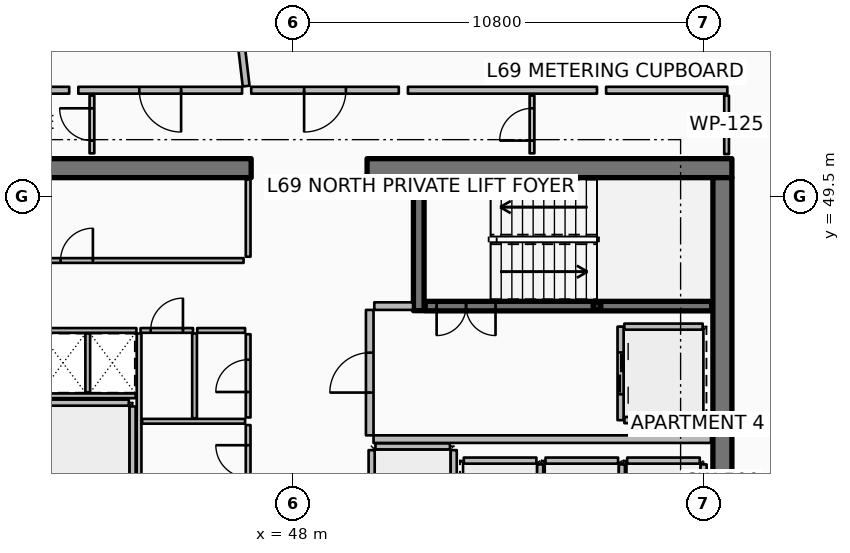
"""IFC4 building model, lengths in metres.
Left out: names, types, materials, properties, quantities, classifications, styles, units other than length and angle.
Written with IfcOpenShell. Run it as: python <this file> out.ifc"""

import sys

from ifc_helpers import new_model, si_unit, direction, frame, frame_2d, origin, origin_2d, place, context, subcontext, project, spatial, rectangle, hollow_rectangle, extrude, element, fill, save


model = new_model("IFC4")
c1 = context("Model", 3, precision=1e-05, world=origin(), true_north=direction((0.0, 1.0)))
c2 = subcontext(c1, "Body", "Model", "MODEL_VIEW")
j1 = project(units=[si_unit("LENGTHUNIT", "METRE"), si_unit("PLANEANGLEUNIT", "RADIAN")], contexts=[c1])
p1 = place(None, origin())
s1 = spatial("IfcSite", under=j1, at=p1, CompositionType="ELEMENT")
p2 = place(p1, origin())
s2 = spatial("IfcBuilding", under=s1, at=p2, CompositionType="ELEMENT")
p3 = place(p2, frame((0.0, 0.0, 275.2)))
s3 = spatial("IfcBuildingStorey", under=s2, at=p3, CompositionType="ELEMENT", Elevation=275.2)
p4 = place(p3, frame((37.3, 50.25, 0.0), z_axis=(0.0, 0.0, 1.0), x_axis=(1.0, 0.0, 0.0)))
e1 = element("IfcWall", 1, at=p4, inside=s3, PredefinedType="SHEAR", context=c2, shape_type="SweptSolid", body=[
    extrude(rectangle(XDim=9.6, YDim=0.5, at=frame_2d((4.8, 0.0))), origin(), (0.0, 0.0, 1.0), 3.85),
])
p5 = place(p3, frame((49.95, 50.25, 0.0), z_axis=(0.0, 0.0, 1.0), x_axis=(1.0, 0.0, 0.0)))
e2 = element("IfcWall", 2, at=p5, inside=s3, PredefinedType="SHEAR", context=c2, shape_type="SweptSolid", body=[
    extrude(rectangle(XDim=9.6, YDim=0.5, at=frame_2d((4.8, 0.0))), origin(), (0.0, 0.0, 1.0), 3.85),
])
p6 = place(p3, frame((59.3, 34.0, 0.0), z_axis=(0.0, 0.0, 1.0), x_axis=(0.0, 1.0, 0.0)))
e3 = element("IfcWall", 3, at=p6, inside=s3, PredefinedType="SHEAR", context=c2, shape_type="SweptSolid", body=[
    extrude(rectangle(XDim=16.0, YDim=0.5, at=frame_2d((8.0, 0.0))), origin(), (0.0, 0.0, 1.0), 3.85),
])
p7 = place(p3, frame((51.31, 46.5, 0.0), z_axis=(0.0, 0.0, 1.0), x_axis=(0.0, 1.0, 0.0)))
e4 = element("IfcWall", 4, at=p7, inside=s3, PredefinedType="SHEAR", context=c2, shape_type="SweptSolid", body=[
    extrude(rectangle(XDim=3.5, YDim=0.28, at=frame_2d((1.75, 0.0))), origin(), (0.0, 0.0, 1.0), 3.85),
])
p8 = place(p3, frame((56.0, 46.62, 0.0), z_axis=(0.0, 0.0, 1.0), x_axis=(1.0, 0.0, 0.0)))
e5 = element("IfcColumn", 5, at=p8, inside=s3, PredefinedType="COLUMN", context=c2, shape_type="SweptSolid", body=[
    extrude(hollow_rectangle(XDim=0.2, YDim=0.2, WallThickness=0.01, InnerFilletRadius=0.01, OuterFilletRadius=0.02, at=origin_2d()), origin(), (0.0, 0.0, 1.0), 1.72),
])
p9 = place(p3, frame((51.48, 46.62, 0.0), z_axis=(0.0, 0.0, 1.0), x_axis=(1.0, 0.0, 0.0)))
e6 = element("IfcWall", 6, at=p9, inside=s3, PredefinedType="SOLIDWALL", context=c2, shape_type="SweptSolid", body=[
    extrude(rectangle(XDim=7.54, YDim=0.25, at=frame_2d((3.77, 0.0))), origin(), (0.0, 0.0, 1.0), 3.59),
])
p10 = place(p9, frame((0.3, 0.0, 0.0)))
e7 = element("IfcOpeningElement", 7, at=p10, cuts=e6, PredefinedType="OPENING", context=c2, shape_type="SweptSolid", body=[
    extrude(rectangle(XDim=1.55, YDim=2.15, at=frame_2d((0.775, 1.075))), frame((0.0, 0.135, 0.0), z_axis=(0.0, -1.0, 0.0), x_axis=(1.0, 0.0, 0.0)), (0.0, 0.0, 1.0), 0.27),
])
p11 = place(p3, frame((54.505, 40.845, 0.0), z_axis=(0.0, 0.0, 1.0), x_axis=(0.0, 1.0, 0.0)))
e8 = element("IfcWall", 8, at=p11, inside=s3, PredefinedType="PARTITIONING", context=c2, shape_type="SweptSolid", body=[
    extrude(rectangle(XDim=1.61, YDim=0.16, at=frame_2d((0.805, 0.0))), origin(), (0.0, 0.0, 1.0), 3.59),
])
p12 = place(p3, frame((52.495, 42.555, 0.0), z_axis=(0.0, 0.0, 1.0), x_axis=(1.0, 0.0, 0.0)))
e9 = element("IfcWall", 9, at=p12, inside=s3, PredefinedType="PARTITIONING", context=c2, shape_type="SweptSolid", body=[
    extrude(rectangle(XDim=1.91, YDim=0.16, at=frame_2d((0.955, 0.0))), origin(), (0.0, 0.0, 1.0), 3.59),
])
p13 = place(p3, frame((56.655, 40.845, 0.0), z_axis=(0.0, 0.0, 1.0), x_axis=(0.0, 1.0, 0.0)))
e10 = element("IfcWall", 10, at=p13, inside=s3, PredefinedType="PARTITIONING", context=c2, shape_type="SweptSolid", body=[
    extrude(rectangle(XDim=1.61, YDim=0.16, at=frame_2d((0.805, 0.0))), origin(), (0.0, 0.0, 1.0), 3.59),
])
p14 = place(p3, frame((54.645, 42.555, 0.0), z_axis=(0.0, 0.0, 1.0), x_axis=(1.0, 0.0, 0.0)))
e11 = element("IfcWall", 11, at=p14, inside=s3, PredefinedType="PARTITIONING", context=c2, shape_type="SweptSolid", body=[
    extrude(rectangle(XDim=1.91, YDim=0.16, at=frame_2d((0.955, 0.0))), origin(), (0.0, 0.0, 1.0), 3.59),
])
p15 = place(p3, frame((58.805, 40.845, 0.0), z_axis=(0.0, 0.0, 1.0), x_axis=(0.0, 1.0, 0.0)))
e12 = element("IfcWall", 12, at=p15, inside=s3, PredefinedType="PARTITIONING", context=c2, shape_type="SweptSolid", body=[
    extrude(rectangle(XDim=1.61, YDim=0.16, at=frame_2d((0.805, 0.0))), origin(), (0.0, 0.0, 1.0), 3.59),
])
p16 = place(p3, frame((56.795, 42.555, 0.0), z_axis=(0.0, 0.0, 1.0), x_axis=(1.0, 0.0, 0.0)))
e13 = element("IfcWall", 13, at=p16, inside=s3, PredefinedType="PARTITIONING", context=c2, shape_type="SweptSolid", body=[
    extrude(rectangle(XDim=1.91, YDim=0.16, at=frame_2d((0.955, 0.0))), origin(), (0.0, 0.0, 1.0), 3.59),
])
p17 = place(p3, frame((43.78, 41.72, 0.0), z_axis=(0.0, 0.0, 1.0), x_axis=(0.0, 1.0, 0.0)))
e14 = element("IfcWall", 14, at=p17, inside=s3, PredefinedType="PARTITIONING", context=c2, shape_type="SweptSolid", body=[
    extrude(rectangle(XDim=2.26, YDim=0.16, at=frame_2d((1.13, 0.0))), origin(), (0.0, 0.0, 1.0), 3.59),
])
p18 = place(p3, frame((41.62, 44.08, 0.0), z_axis=(0.0, 0.0, 1.0), x_axis=(1.0, 0.0, 0.0)))
e15 = element("IfcWall", 15, at=p18, inside=s3, PredefinedType="PARTITIONING", context=c2, shape_type="SweptSolid", body=[
    extrude(rectangle(XDim=2.06, YDim=0.16, at=frame_2d((1.03, 0.0))), origin(), (0.0, 0.0, 1.0), 3.59),
])
p19 = place(p3, frame((56.62, 46.08, 0.0), z_axis=(0.0, 0.0, 1.0), x_axis=(0.0, -1.0, 0.0)))
e16 = element("IfcWall", 16, at=p19, inside=s3, PredefinedType="PARTITIONING", context=c2, shape_type="SweptSolid", body=[
    extrude(rectangle(XDim=2.46, YDim=0.16, at=frame_2d((1.23, 0.0))), origin(), (0.0, 0.0, 1.0), 3.59),
])
p20 = place(p19, frame((0.68, 0.0, 0.0)))
e17 = element("IfcOpeningElement", 17, at=p20, cuts=e16, PredefinedType="OPENING", context=c2, shape_type="SweptSolid", body=[
    extrude(rectangle(XDim=1.1, YDim=2.1, at=frame_2d((0.55, 1.05))), frame((0.0, 0.09, 0.0), z_axis=(0.0, -1.0, 0.0), x_axis=(1.0, 0.0, 0.0)), (0.0, 0.0, 1.0), 0.18),
])
for number, where, z_axis, x_axis in (
    (18, (56.72, 46.08, 0.0), (0.0, 0.0, 1.0), (1.0, 0.0, 0.0)),
    (19, (56.72, 43.62, 0.0), (0.0, 0.0, 1.0), (1.0, 0.0, 0.0)),
):
    element("IfcWall", number, at=place(p3, frame(where, z_axis=z_axis, x_axis=x_axis)), inside=s3, PredefinedType="PARTITIONING", context=c2, shape_type="SweptSolid", body=[
        extrude(rectangle(XDim=2.06, YDim=0.16, at=frame_2d((1.03, 0.0))), origin(), (0.0, 0.0, 1.0), 3.59),
    ])
for number, where, z_axis, x_axis in (
    (20, (52.23, 40.67, 0.0), (0.0, 0.0, 1.0), (0.0, 1.0, 0.0)),
    (21, (50.07, 40.67, 0.0), (0.0, 0.0, 1.0), (0.0, 1.0, 0.0)),
):
    element("IfcWall", number, at=place(p3, frame(where, z_axis=z_axis, x_axis=x_axis)), inside=s3, PredefinedType="PARTITIONING", context=c2, shape_type="SweptSolid", body=[
        extrude(rectangle(XDim=2.16, YDim=0.16, at=frame_2d((1.08, 0.0))), origin(), (0.0, 0.0, 1.0), 3.59),
    ])
p21 = place(p3, frame((50.17, 42.93, 0.0), z_axis=(0.0, 0.0, 1.0), x_axis=(1.0, 0.0, 0.0)))
e22 = element("IfcWall", 22, at=p21, inside=s3, PredefinedType="PARTITIONING", context=c2, shape_type="SweptSolid", body=[
    extrude(rectangle(XDim=1.96, YDim=0.16, at=frame_2d((0.98, 0.0))), origin(), (0.0, 0.0, 1.0), 3.59),
])
p22 = place(p3, frame((46.82, 47.92, 0.0), z_axis=(0.0, 0.0, 1.0), x_axis=(0.0, 1.0, 0.0)))
e23 = element("IfcWall", 23, at=p22, inside=s3, PredefinedType="PARTITIONING", context=c2, shape_type="SweptSolid", body=[
    extrude(rectangle(XDim=2.03, YDim=0.125, at=frame_2d((1.015, 0.0))), origin(), (0.0, 0.0, 1.0), 3.03),
])
p23 = place(p3, frame((37.92, 47.82, 0.0), z_axis=(0.0, 0.0, 1.0), x_axis=(1.0, 0.0, 0.0)))
e24 = element("IfcWall", 24, at=p23, inside=s3, PredefinedType="PARTITIONING", context=c2, shape_type="SweptSolid", body=[
    extrude(rectangle(XDim=8.78, YDim=0.125, at=frame_2d((4.39, 0.0))), origin(), (0.0, 0.0, 1.0), 3.03),
])
p24 = place(p23, frame((3.965, 0.0, 0.0)))
e25 = element("IfcOpeningElement", 25, at=p24, cuts=e24, PredefinedType="OPENING", context=c2, shape_type="SweptSolid", body=[
    extrude(rectangle(XDim=0.85, YDim=2.06, at=frame_2d((0.425, 1.03))), frame((0.0, 0.073, 0.0), z_axis=(0.0, -1.0, 0.0), x_axis=(1.0, 0.0, 0.0)), (0.0, 0.0, 1.0), 0.145),
])
p25 = place(p3, frame((50.12, 43.12, 0.0), z_axis=(0.0, 0.0, 1.0), x_axis=(1.0, 0.0, 0.0)))
e26 = element("IfcWall", 26, at=p25, inside=s3, PredefinedType="PARTITIONING", context=c2, shape_type="SweptSolid", body=[
    extrude(rectangle(XDim=8.88, YDim=0.2, at=frame_2d((4.44, 0.0))), origin(), (0.0, 0.0, 1.0), 3.59),
])
p26 = place(p3, frame((50.14, 46.62, 0.0), z_axis=(0.0, 0.0, 1.0), x_axis=(1.0, 0.0, 0.0)))
e27 = element("IfcWall", 27, at=p26, inside=s3, PredefinedType="PARTITIONING", context=c2, shape_type="SweptSolid", body=[
    extrude(rectangle(XDim=1.02, YDim=0.2, at=frame_2d((0.51, 0.0))), origin(), (0.0, 0.0, 1.0), 3.59),
])
p27 = place(p3, frame((50.02, 43.22, 0.0), z_axis=(0.0, 0.0, 1.0), x_axis=(0.0, 1.0, 0.0)))
e28 = element("IfcWall", 28, at=p27, inside=s3, PredefinedType="PARTITIONING", context=c2, shape_type="SweptSolid", body=[
    extrude(rectangle(XDim=3.3, YDim=0.2, at=frame_2d((1.65, 0.0))), origin(), (0.0, 0.0, 1.0), 3.59),
])
p28 = place(p27, frame((1.125, 0.0, 0.0)))
e29 = element("IfcOpeningElement", 29, at=p28, cuts=e28, PredefinedType="OPENING", context=c2, shape_type="SweptSolid", body=[
    extrude(rectangle(XDim=1.05, YDim=2.1, at=frame_2d((0.525, 1.05))), frame((0.0, 0.11, 0.0), z_axis=(0.0, -1.0, 0.0), x_axis=(1.0, 0.0, 0.0)), (0.0, 0.0, 1.0), 0.22),
])
p29 = place(p3, frame((41.36, 44.26, 0.0), z_axis=(0.0, 0.0, 1.0), x_axis=(1.0, 0.0, 0.0)))
e30 = element("IfcWall", 30, at=p29, inside=s3, PredefinedType="PARTITIONING", context=c2, shape_type="SweptSolid", body=[
    extrude(rectangle(XDim=2.5, YDim=0.125, at=frame_2d((1.25, 0.0))), origin(), (0.0, 0.0, 1.0), 3.03),
])
p30 = place(p3, frame((42.6, 44.35, 0.0), z_axis=(0.0, 0.0, 1.0), x_axis=(0.0, 1.0, 0.0)))
e31 = element("IfcWall", 31, at=p30, inside=s3, PredefinedType="PARTITIONING", context=c2, shape_type="SweptSolid", body=[
    extrude(rectangle(XDim=1.55, YDim=0.125, at=frame_2d((0.775, 0.0))), origin(), (0.0, 0.0, 1.0), 3.03),
])
p31 = place(p3, frame((43.95, 41.58, 0.0), z_axis=(0.0, 0.0, 1.0), x_axis=(0.0, 1.0, 0.0)))
e32 = element("IfcWall", 32, at=p31, inside=s3, PredefinedType="PARTITIONING", context=c2, shape_type="SweptSolid", body=[
    extrude(rectangle(XDim=4.32, YDim=0.125, at=frame_2d((2.16, 0.0))), origin(), (0.0, 0.0, 1.0), 3.03),
])
p32 = place(p3, frame((44.03, 43.59, 0.0), z_axis=(0.0, 0.0, 1.0), x_axis=(1.0, 0.0, 0.0)))
e33 = element("IfcWall", 33, at=p32, inside=s3, PredefinedType="PARTITIONING", context=c2, shape_type="SweptSolid", body=[
    extrude(rectangle(XDim=2.71, YDim=0.125, at=frame_2d((1.355, 0.0))), origin(), (0.0, 0.0, 1.0), 3.03),
])
p33 = place(p3, frame((45.41, 43.67, 0.0), z_axis=(0.0, 0.0, 1.0), x_axis=(0.0, 1.0, 0.0)))
e34 = element("IfcWall", 34, at=p33, inside=s3, PredefinedType="PARTITIONING", context=c2, shape_type="SweptSolid", body=[
    extrude(rectangle(XDim=2.23, YDim=0.125, at=frame_2d((1.115, 0.0))), origin(), (0.0, 0.0, 1.0), 3.03),
])
p34 = place(p3, frame((46.82, 41.58, 0.0), z_axis=(0.0, 0.0, 1.0), x_axis=(0.0, 1.0, 0.0)))
e35 = element("IfcWall", 35, at=p34, inside=s3, PredefinedType="PARTITIONING", context=c2, shape_type="SweptSolid", body=[
    extrude(rectangle(XDim=1.91, YDim=0.125, at=frame_2d((0.955, 0.0))), origin(), (0.0, 0.0, 1.0), 3.03),
])
p35 = place(p34, frame((0.53, 0.0, 0.0)))
e36 = element("IfcOpeningElement", 36, at=p35, cuts=e35, PredefinedType="OPENING", context=c2, shape_type="SweptSolid", body=[
    extrude(rectangle(XDim=0.85, YDim=2.06, at=frame_2d((0.425, 1.03))), frame((0.0, 0.073, 0.0), z_axis=(0.0, -1.0, 0.0), x_axis=(1.0, 0.0, 0.0)), (0.0, 0.0, 1.0), 0.145),
])
p36 = place(p3, frame((46.82, 43.69, 0.0), z_axis=(0.0, 0.0, 1.0), x_axis=(0.0, 1.0, 0.0)))
e37 = element("IfcWall", 37, at=p36, inside=s3, PredefinedType="PARTITIONING", context=c2, shape_type="SweptSolid", body=[
    extrude(rectangle(XDim=2.19, YDim=0.125, at=frame_2d((1.095, 0.0))), origin(), (0.0, 0.0, 1.0), 3.03),
])
p37 = place(p36, frame((0.67, 0.0, 0.0)))
e38 = element("IfcOpeningElement", 38, at=p37, cuts=e37, PredefinedType="OPENING", context=c2, shape_type="SweptSolid", body=[
    extrude(rectangle(XDim=0.85, YDim=2.06, at=frame_2d((0.425, 1.03))), frame((0.0, 0.073, 0.0), z_axis=(0.0, -1.0, 0.0), x_axis=(1.0, 0.0, 0.0)), (0.0, 0.0, 1.0), 0.145),
])
p38 = place(p3, frame((41.35, 45.98, 0.0), z_axis=(0.0, 0.0, 1.0), x_axis=(1.0, 0.0, 0.0)))
e39 = element("IfcWall", 39, at=p38, inside=s3, PredefinedType="PARTITIONING", context=c2, shape_type="SweptSolid", body=[
    extrude(rectangle(XDim=2.53, YDim=0.125, at=frame_2d((1.265, 0.0))), origin(), (0.0, 0.0, 1.0), 3.03),
])
p39 = place(p3, frame((43.99, 45.98, 0.0), z_axis=(0.0, 0.0, 1.0), x_axis=(1.0, 0.0, 0.0)))
e40 = element("IfcWall", 40, at=p39, inside=s3, PredefinedType="PARTITIONING", context=c2, shape_type="SweptSolid", body=[
    extrude(rectangle(XDim=1.38, YDim=0.125, at=frame_2d((0.69, 0.0))), origin(), (0.0, 0.0, 1.0), 3.03),
])
p40 = place(p39, frame((0.265, 0.0, 0.0)))
e41 = element("IfcOpeningElement", 41, at=p40, cuts=e40, PredefinedType="OPENING", context=c2, shape_type="SweptSolid", body=[
    extrude(rectangle(XDim=0.85, YDim=2.06, at=frame_2d((0.425, 1.03))), frame((0.0, 0.073, 0.0), z_axis=(0.0, -1.0, 0.0), x_axis=(1.0, 0.0, 0.0)), (0.0, 0.0, 1.0), 0.145),
])
p41 = place(p3, frame((45.48, 45.98, 0.0), z_axis=(0.0, 0.0, 1.0), x_axis=(1.0, 0.0, 0.0)))
e42 = element("IfcWall", 42, at=p41, inside=s3, PredefinedType="PARTITIONING", context=c2, shape_type="SweptSolid", body=[
    extrude(rectangle(XDim=1.26, YDim=0.125, at=frame_2d((0.63, 0.0))), origin(), (0.0, 0.0, 1.0), 3.03),
])
p42 = place(p3, frame((59.41, 50.62, 0.0), z_axis=(0.0, 0.0, 1.0), x_axis=(0.0, 1.0, 0.0)))
e43 = element("IfcWall", 43, at=p42, inside=s3, PredefinedType="PARTITIONING", context=c2, shape_type="SweptSolid", body=[
    extrude(rectangle(XDim=1.54, YDim=0.125, at=frame_2d((0.77, 0.0))), origin(), (0.0, 0.0, 1.0), 3.03),
])
p43 = place(p3, frame((42.71, 50.64, 0.0), z_axis=(0.0, 0.0, 1.0), x_axis=(0.0, 1.0, 0.0)))
e44 = element("IfcWall", 44, at=p43, inside=s3, PredefinedType="PARTITIONING", context=c2, shape_type="SweptSolid", body=[
    extrude(rectangle(XDim=1.52, YDim=0.125, at=frame_2d((0.76, 0.0))), origin(), (0.0, 0.0, 1.0), 2.957),
])
p44 = place(p43, frame((0.335, 0.0, 0.0)))
e45 = element("IfcOpeningElement", 45, at=p44, cuts=e44, PredefinedType="OPENING", context=c2, shape_type="SweptSolid", body=[
    extrude(rectangle(XDim=0.85, YDim=2.06, at=frame_2d((0.425, 1.03))), frame((0.0, 0.073, 0.0), z_axis=(0.0, -1.0, 0.0), x_axis=(1.0, 0.0, 0.0)), (0.0, 0.0, 1.0), 0.145),
])
p45 = place(p3, frame((54.29, 50.64, 0.0), z_axis=(0.0, 0.0, 1.0), x_axis=(0.0, 1.0, 0.0)))
e46 = element("IfcWall", 46, at=p45, inside=s3, PredefinedType="PARTITIONING", context=c2, shape_type="SweptSolid", body=[
    extrude(rectangle(XDim=1.52, YDim=0.125, at=frame_2d((0.76, 0.0))), origin(), (0.0, 0.0, 1.0), 3.03),
])
p46 = place(p45, frame((0.335, 0.0, 0.0)))
e47 = element("IfcOpeningElement", 47, at=p46, cuts=e46, PredefinedType="OPENING", context=c2, shape_type="SweptSolid", body=[
    extrude(rectangle(XDim=0.85, YDim=2.06, at=frame_2d((0.425, 1.03))), frame((0.0, 0.073, 0.0), z_axis=(0.0, -1.0, 0.0), x_axis=(1.0, 0.0, 0.0)), (0.0, 0.0, 1.0), 0.145),
])
p47 = place(p3, frame((46.768, 52.409, 0.0), z_axis=(0.0, 0.0, 1.0), x_axis=(-0.117545848714, 0.993067456646, 0.0)))
e48 = element("IfcWall", 48, at=p47, inside=s3, PredefinedType="PARTITIONING", context=c2, shape_type="SweptSolid", body=[
    extrude(rectangle(XDim=14.213, YDim=0.18, at=frame_2d((7.106, 0.0))), origin(), (0.0, 0.0, 1.0), 2.957),
])
p48 = place(p3, frame((46.661, 52.3, 0.0), z_axis=(0.0, 0.0, 1.0), x_axis=(-1.0, 0.0, 0.0)))
e49 = element("IfcWall", 49, at=p48, inside=s3, PredefinedType="PARTITIONING", context=c2, shape_type="SweptSolid", body=[
    extrude(rectangle(XDim=4.309, YDim=0.18, at=frame_2d((2.155, 0.0))), origin(), (0.0, 0.0, 1.0), 2.957),
])
p49 = place(p48, frame((1.604, 0.0, 0.0)))
e50 = element("IfcOpeningElement", 50, at=p49, cuts=e49, PredefinedType="OPENING", context=c2, shape_type="SweptSolid", body=[
    extrude(rectangle(XDim=1.1, YDim=2.1, at=frame_2d((0.55, 1.05))), frame((0.0, 0.1, 0.0), z_axis=(0.0, -1.0, 0.0), x_axis=(1.0, 0.0, 0.0)), (0.0, 0.0, 1.0), 0.2),
])
p50 = place(p3, frame((42.112, 52.3, 0.0), z_axis=(0.0, 0.0, 1.0), x_axis=(-1.0, 0.0, 0.0)))
e51 = element("IfcWall", 51, at=p50, inside=s3, PredefinedType="PARTITIONING", context=c2, shape_type="SweptSolid", body=[
    extrude(rectangle(XDim=4.692, YDim=0.18, at=frame_2d((2.346, 0.0))), origin(), (0.0, 0.0, 1.0), 2.957),
])
p51 = place(p3, frame((50.785, 52.3, 0.0), z_axis=(0.0, 0.0, 1.0), x_axis=(-1.0, 0.0, 0.0)))
e52 = element("IfcWall", 52, at=p51, inside=s3, PredefinedType="PARTITIONING", context=c2, shape_type="SweptSolid", body=[
    extrude(rectangle(XDim=3.884, YDim=0.18, at=frame_2d((1.942, 0.0))), origin(), (0.0, 0.0, 1.0), 2.957),
])
p52 = place(p51, frame((1.392, 0.0, 0.0)))
e53 = element("IfcOpeningElement", 53, at=p52, cuts=e52, PredefinedType="OPENING", context=c2, shape_type="SweptSolid", body=[
    extrude(rectangle(XDim=1.1, YDim=2.1, at=frame_2d((0.55, 1.05))), frame((0.0, 0.1, 0.0), z_axis=(0.0, -1.0, 0.0), x_axis=(1.0, 0.0, 0.0)), (0.0, 0.0, 1.0), 0.2),
])
p53 = place(p3, frame((59.43, 52.3, 0.0), z_axis=(0.0, 0.0, 1.0), x_axis=(-1.0, 0.0, 0.0)))
e54 = element("IfcWall", 54, at=p53, inside=s3, PredefinedType="PARTITIONING", context=c2, shape_type="SweptSolid", body=[
    extrude(rectangle(XDim=3.19, YDim=0.18, at=frame_2d((1.595, 0.0))), origin(), (0.0, 0.0, 1.0), 2.957),
])
p54 = place(p3, frame((56.0, 52.3, 0.0), z_axis=(0.0, 0.0, 1.0), x_axis=(-1.0, 0.0, 0.0)))
e55 = element("IfcWall", 55, at=p54, inside=s3, PredefinedType="PARTITIONING", context=c2, shape_type="SweptSolid", body=[
    extrude(rectangle(XDim=4.975, YDim=0.18, at=frame_2d((2.488, 0.0))), origin(), (0.0, 0.0, 1.0), 2.957),
])
p55 = place(p10, origin())
e56 = element("IfcDoor", 56, at=p55, inside=s3, OperationType="DOUBLE_DOOR_SINGLE_SWING", PredefinedType="DOOR", context=c2, shape_type="SweptSolid", body=[
    extrude(rectangle(XDim=1.55, YDim=2.15, at=frame_2d((0.775, 1.075))), frame((0.0, 0.025, 0.0), z_axis=(0.0, -1.0, 0.0), x_axis=(1.0, 0.0, 0.0)), (0.0, 0.0, 1.0), 0.05),
])
fill(e7, e56)
p56 = place(p20, origin())
e57 = element("IfcDoor", 57, at=p56, inside=s3, OperationType="DOUBLE_DOOR_SLIDING", PredefinedType="DOOR", context=c2, shape_type="SweptSolid", body=[
    extrude(rectangle(XDim=1.1, YDim=2.1, at=frame_2d((0.55, 1.05))), frame((0.0, 0.025, 0.0), z_axis=(0.0, -1.0, 0.0), x_axis=(1.0, 0.0, 0.0)), (0.0, 0.0, 1.0), 0.05),
])
fill(e17, e57)
p57 = place(p24, origin())
e58 = element("IfcDoor", 58, at=p57, inside=s3, OperationType="SINGLE_SWING_RIGHT", PredefinedType="DOOR", context=c2, shape_type="SweptSolid", body=[
    extrude(rectangle(XDim=0.85, YDim=2.06, at=frame_2d((0.425, 1.03))), frame((0.0, 0.025, 0.0), z_axis=(0.0, -1.0, 0.0), x_axis=(1.0, 0.0, 0.0)), (0.0, 0.0, 1.0), 0.05),
])
fill(e25, e58)
p58 = place(p28, origin())
e59 = element("IfcDoor", 59, at=p58, inside=s3, OperationType="SINGLE_SWING_LEFT", PredefinedType="DOOR", context=c2, shape_type="SweptSolid", body=[
    extrude(rectangle(XDim=1.05, YDim=2.1, at=frame_2d((0.525, 1.05))), frame((0.0, 0.025, 0.0), z_axis=(0.0, -1.0, 0.0), x_axis=(1.0, 0.0, 0.0)), (0.0, 0.0, 1.0), 0.05),
])
fill(e29, e59)
p59 = place(p35, origin())
e60 = element("IfcDoor", 60, at=p59, inside=s3, OperationType="SINGLE_SWING_RIGHT", PredefinedType="DOOR", context=c2, shape_type="SweptSolid", body=[
    extrude(rectangle(XDim=0.85, YDim=2.06, at=frame_2d((0.425, 1.03))), frame((0.0, 0.025, 0.0), z_axis=(0.0, -1.0, 0.0), x_axis=(1.0, 0.0, 0.0)), (0.0, 0.0, 1.0), 0.05),
])
fill(e36, e60)
p60 = place(p37, origin())
e61 = element("IfcDoor", 61, at=p60, inside=s3, OperationType="SINGLE_SWING_LEFT", PredefinedType="DOOR", context=c2, shape_type="SweptSolid", body=[
    extrude(rectangle(XDim=0.85, YDim=2.06, at=frame_2d((0.425, 1.03))), frame((0.0, 0.025, 0.0), z_axis=(0.0, -1.0, 0.0), x_axis=(1.0, 0.0, 0.0)), (0.0, 0.0, 1.0), 0.05),
])
fill(e38, e61)
p61 = place(p40, origin())
e62 = element("IfcDoor", 62, at=p61, inside=s3, OperationType="SINGLE_SWING_RIGHT", PredefinedType="DOOR", context=c2, shape_type="SweptSolid", body=[
    extrude(rectangle(XDim=0.85, YDim=2.06, at=frame_2d((0.425, 1.03))), frame((0.0, 0.025, 0.0), z_axis=(0.0, -1.0, 0.0), x_axis=(1.0, 0.0, 0.0)), (0.0, 0.0, 1.0), 0.05),
])
fill(e41, e62)
p62 = place(p44, origin())
e63 = element("IfcDoor", 63, at=p62, inside=s3, OperationType="SINGLE_SWING_RIGHT", PredefinedType="DOOR", context=c2, shape_type="SweptSolid", body=[
    extrude(rectangle(XDim=0.85, YDim=2.06, at=frame_2d((0.425, 1.03))), frame((0.0, 0.025, 0.0), z_axis=(0.0, -1.0, 0.0), x_axis=(1.0, 0.0, 0.0)), (0.0, 0.0, 1.0), 0.05),
])
fill(e45, e63)
p63 = place(p46, origin())
e64 = element("IfcDoor", 64, at=p63, inside=s3, OperationType="SINGLE_SWING_LEFT", PredefinedType="DOOR", context=c2, shape_type="SweptSolid", body=[
    extrude(rectangle(XDim=0.85, YDim=2.06, at=frame_2d((0.425, 1.03))), frame((0.0, 0.025, 0.0), z_axis=(0.0, -1.0, 0.0), x_axis=(1.0, 0.0, 0.0)), (0.0, 0.0, 1.0), 0.05),
])
fill(e47, e64)
p64 = place(p49, origin())
e65 = element("IfcDoor", 65, at=p64, inside=s3, OperationType="SINGLE_SWING_LEFT", PredefinedType="DOOR", context=c2, shape_type="SweptSolid", body=[
    extrude(rectangle(XDim=1.1, YDim=2.1, at=frame_2d((0.55, 1.05))), frame((0.0, 0.025, 0.0), z_axis=(0.0, -1.0, 0.0), x_axis=(1.0, 0.0, 0.0)), (0.0, 0.0, 1.0), 0.05),
])
fill(e50, e65)
p65 = place(p52, origin())
e66 = element("IfcDoor", 66, at=p65, inside=s3, OperationType="SINGLE_SWING_RIGHT", PredefinedType="DOOR", context=c2, shape_type="SweptSolid", body=[
    extrude(rectangle(XDim=1.1, YDim=2.1, at=frame_2d((0.55, 1.05))), frame((0.0, 0.025, 0.0), z_axis=(0.0, -1.0, 0.0), x_axis=(1.0, 0.0, 0.0)), (0.0, 0.0, 1.0), 0.05),
])
fill(e53, e66)
save(model, sys.argv[1])
